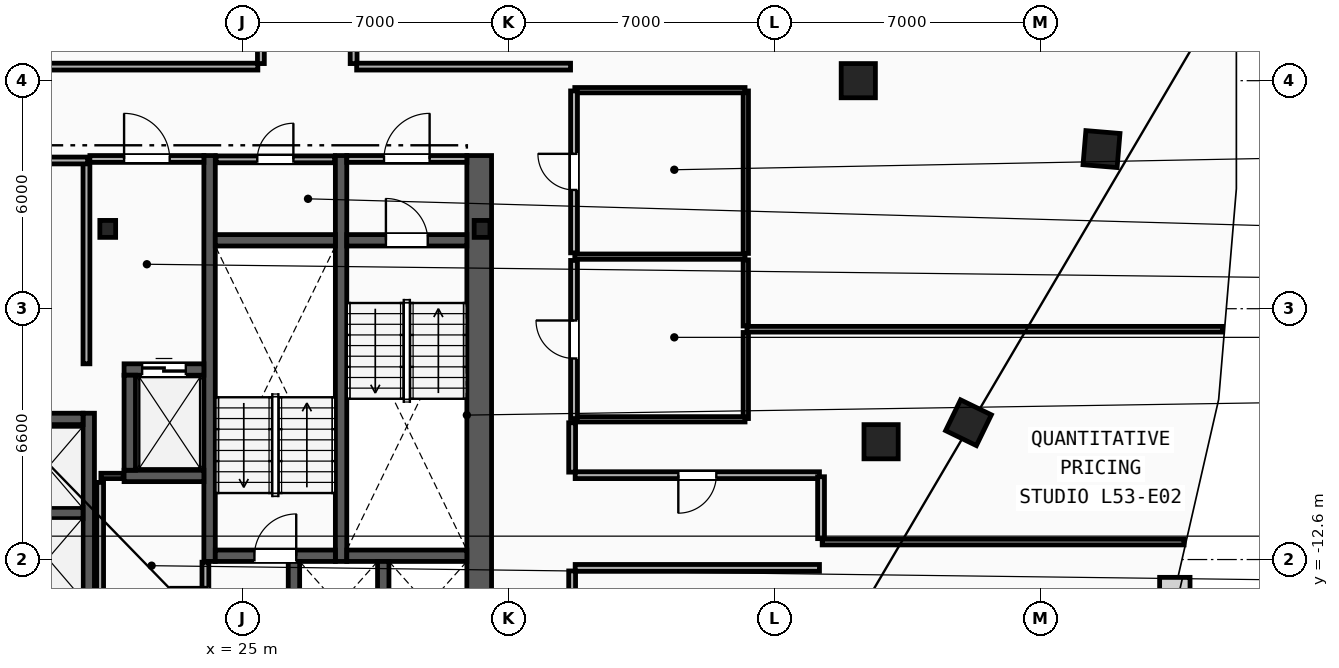
"""IFC4 building model, lengths in metres.
Left out: names, types, materials, properties, quantities, classifications, styles, units other than length and angle.
Written with IfcOpenShell. Run it as: python <this file> out.ifc"""

import sys

from ifc_helpers import new_model, si_unit, direction, frame, frame_2d, origin, origin_2d, place, context, subcontext, project, spatial, rectangle, i_section, extrude, element, fill, save


model = new_model("IFC4")
c1 = context("Model", 3, precision=1e-05, world=origin(), true_north=direction((0.0, 1.0)))
c2 = subcontext(c1, "Body", "Model", "MODEL_VIEW")
j1 = project(units=[si_unit("LENGTHUNIT", "METRE"), si_unit("PLANEANGLEUNIT", "RADIAN")], contexts=[c1])
p1 = place(None, origin())
s1 = spatial("IfcSite", under=j1, at=p1, CompositionType="ELEMENT")
p2 = place(p1, origin())
s2 = spatial("IfcBuilding", under=s1, at=p2, CompositionType="ELEMENT")
p3 = place(p2, frame((0.0, 0.0, 202.6)))
s3 = spatial("IfcBuildingStorey", under=s2, at=p3, CompositionType="ELEMENT", Elevation=202.6)
for number, where, z_axis, x_axis in (
    (1, (31.3, -3.9, 0.0), (0.0, 0.0, 1.0), (1.0, 0.0, 0.0)),
    (2, (21.45, -3.9, 0.0), (0.0, 0.0, 1.0), (1.0, 0.0, 0.0)),
):
    element("IfcColumn", number, at=place(p3, frame(where, z_axis=z_axis, x_axis=x_axis)), inside=s3, PredefinedType="COLUMN", context=c2, shape_type="SweptSolid", body=[
        extrude(i_section(OverallWidth=0.416, OverallDepth=0.446, WebThickness=0.039, FlangeThickness=0.063, FilletRadius=0.018, at=origin_2d()), origin(), (0.0, 0.0, 1.0), 3.6),
    ])
for number, where, z_axis, x_axis in (
    (3, (41.2, 0.0, 0.0), (0.0, 0.0, 1.0), (1.0, 0.0, 0.0)),
    (4, (41.8, -9.5, 0.0), (0.0, 0.0, 1.0), (1.0, 0.0, 0.0)),
    (5, (44.1, -9.0, 0.0), (0.0, 0.0, 1.0), (0.437, 0.899, 0.0)),
    (6, (47.6, -1.8, 0.0), (0.0, 0.0, 1.0), (0.084, 0.997, 0.0)),
):
    element("IfcColumn", number, at=place(p3, frame(where, z_axis=z_axis, x_axis=x_axis)), inside=s3, PredefinedType="COLUMN", context=c2, shape_type="SweptSolid", body=[
        extrude(rectangle(XDim=0.9, YDim=0.9, at=origin_2d()), origin(), (0.0, 0.0, 1.0), 3.6),
    ])
p4 = place(p3, frame((31.225, -15.3, 0.0), z_axis=(0.0, 0.0, 1.0), x_axis=(0.0, 1.0, 0.0)))
e7 = element("IfcWall", 7, at=p4, inside=s3, PredefinedType="SHEAR", context=c2, shape_type="SweptSolid", body=[
    extrude(rectangle(XDim=13.33, YDim=0.65, at=frame_2d((6.665, 0.0))), origin(), (0.0, 0.0, 1.0), 3.34),
])
for number, where, z_axis, x_axis in (
    (8, (27.59, -12.65, 0.0), (0.0, 0.0, 1.0), (0.0, 1.0, 0.0)),
    (9, (24.13, -12.65, 0.0), (0.0, 0.0, 1.0), (0.0, 1.0, 0.0)),
):
    element("IfcWall", number, at=place(p3, frame(where, z_axis=z_axis, x_axis=x_axis)), inside=s3, PredefinedType="SHEAR", context=c2, shape_type="SweptSolid", body=[
        extrude(rectangle(XDim=10.68, YDim=0.3, at=frame_2d((5.34, 0.0))), origin(), (0.0, 0.0, 1.0), 3.34),
    ])
p5 = place(p3, frame((27.74, -4.2, 0.0), z_axis=(0.0, 0.0, 1.0), x_axis=(1.0, 0.0, 0.0)))
e10 = element("IfcWall", 10, at=p5, inside=s3, PredefinedType="SHEAR", context=c2, shape_type="SweptSolid", body=[
    extrude(rectangle(XDim=3.16, YDim=0.3, at=frame_2d((1.58, 0.0))), origin(), (0.0, 0.0, 1.0), 3.34),
])
p6 = place(p5, frame((1.03, 0.0, 0.0)))
e11 = element("IfcOpeningElement", 11, at=p6, cuts=e10, PredefinedType="OPENING", context=c2, shape_type="SweptSolid", body=[
    extrude(rectangle(XDim=1.1, YDim=2.15, at=frame_2d((0.55, 1.075))), frame((0.0, 0.16, 0.0), z_axis=(0.0, -1.0, 0.0), x_axis=(1.0, 0.0, 0.0)), (0.0, 0.0, 1.0), 0.32),
])
p7 = place(p3, frame((27.74, -12.5, 0.0), z_axis=(0.0, 0.0, 1.0), x_axis=(1.0, 0.0, 0.0)))
e12 = element("IfcWall", 12, at=p7, inside=s3, PredefinedType="SHEAR", context=c2, shape_type="SweptSolid", body=[
    extrude(rectangle(XDim=3.16, YDim=0.3, at=frame_2d((1.58, 0.0))), origin(), (0.0, 0.0, 1.0), 3.34),
])
p8 = place(p3, frame((24.28, -12.5, 0.0), z_axis=(0.0, 0.0, 1.0), x_axis=(1.0, 0.0, 0.0)))
e13 = element("IfcWall", 13, at=p8, inside=s3, PredefinedType="SHEAR", context=c2, shape_type="SweptSolid", body=[
    extrude(rectangle(XDim=3.16, YDim=0.3, at=frame_2d((1.58, 0.0))), origin(), (0.0, 0.0, 1.0), 3.34),
])
p9 = place(p8, frame((1.03, 0.0, 0.0)))
e14 = element("IfcOpeningElement", 14, at=p9, cuts=e13, PredefinedType="OPENING", context=c2, shape_type="SweptSolid", body=[
    extrude(rectangle(XDim=1.1, YDim=2.15, at=frame_2d((0.55, 1.075))), frame((0.0, 0.16, 0.0), z_axis=(0.0, -1.0, 0.0), x_axis=(1.0, 0.0, 0.0)), (0.0, 0.0, 1.0), 0.32),
])
p10 = place(p3, frame((24.28, -4.2, 0.0), z_axis=(0.0, 0.0, 1.0), x_axis=(1.0, 0.0, 0.0)))
e15 = element("IfcWall", 15, at=p10, inside=s3, PredefinedType="SHEAR", context=c2, shape_type="SweptSolid", body=[
    extrude(rectangle(XDim=3.16, YDim=0.3, at=frame_2d((1.58, 0.0))), origin(), (0.0, 0.0, 1.0), 3.34),
])
p11 = place(p3, frame((20.89, -7.45, 0.0), z_axis=(0.0, 0.0, 1.0), x_axis=(0.0, 1.0, 0.0)))
e16 = element("IfcWall", 16, at=p11, inside=s3, PredefinedType="PARTITIONING", context=c2, shape_type="SweptSolid", body=[
    extrude(rectangle(XDim=5.3, YDim=0.18, at=frame_2d((2.65, 0.0))), origin(), (0.0, 0.0, 1.0), 3.34),
])
p12 = place(p3, frame((20.98, -2.06, 0.0), z_axis=(0.0, 0.0, 1.0), x_axis=(1.0, 0.0, 0.0)))
e17 = element("IfcWall", 17, at=p12, inside=s3, PredefinedType="PARTITIONING", context=c2, shape_type="SweptSolid", body=[
    extrude(rectangle(XDim=3.0, YDim=0.18, at=frame_2d((1.5, 0.0))), origin(), (0.0, 0.0, 1.0), 3.34),
])
p13 = place(p12, frame((0.9, 0.0, 0.0)))
e18 = element("IfcOpeningElement", 18, at=p13, cuts=e17, PredefinedType="OPENING", context=c2, shape_type="SweptSolid", body=[
    extrude(rectangle(XDim=1.2, YDim=2.15, at=frame_2d((0.6, 1.075))), frame((0.0, 0.1, 0.0), z_axis=(0.0, -1.0, 0.0), x_axis=(1.0, 0.0, 0.0)), (0.0, 0.0, 1.0), 0.2),
])
p14 = place(p3, frame((27.74, -2.06, 0.0), z_axis=(0.0, 0.0, 1.0), x_axis=(1.0, 0.0, 0.0)))
e19 = element("IfcWall", 19, at=p14, inside=s3, PredefinedType="PARTITIONING", context=c2, shape_type="SweptSolid", body=[
    extrude(rectangle(XDim=3.16, YDim=0.18, at=frame_2d((1.58, 0.0))), origin(), (0.0, 0.0, 1.0), 3.34),
])
p15 = place(p14, frame((0.98, 0.0, 0.0)))
e20 = element("IfcOpeningElement", 20, at=p15, cuts=e19, PredefinedType="OPENING", context=c2, shape_type="SweptSolid", body=[
    extrude(rectangle(XDim=1.2, YDim=2.15, at=frame_2d((0.6, 1.075))), frame((0.0, 0.1, 0.0), z_axis=(0.0, -1.0, 0.0), x_axis=(1.0, 0.0, 0.0)), (0.0, 0.0, 1.0), 0.2),
])
p16 = place(p3, frame((21.88, -7.6, 0.0), z_axis=(0.0, 0.0, 1.0), x_axis=(1.0, 0.0, 0.0)))
e21 = element("IfcWall", 21, at=p16, inside=s3, PredefinedType="SHEAR", context=c2, shape_type="SweptSolid", body=[
    extrude(rectangle(XDim=2.1, YDim=0.3, at=frame_2d((1.05, 0.0))), origin(), (0.0, 0.0, 1.0), 3.34),
])
p17 = place(p16, frame((0.475, 0.0, 0.0)))
e22 = element("IfcOpeningElement", 22, at=p17, cuts=e21, PredefinedType="OPENING", context=c2, shape_type="SweptSolid", body=[
    extrude(rectangle(XDim=1.15, YDim=2.2, at=frame_2d((0.575, 1.1))), frame((0.0, 0.16, 0.0), z_axis=(0.0, -1.0, 0.0), x_axis=(1.0, 0.0, 0.0)), (0.0, 0.0, 1.0), 0.32),
])
p18 = place(p3, frame((21.88, -10.4, 0.0), z_axis=(0.0, 0.0, 1.0), x_axis=(1.0, 0.0, 0.0)))
e23 = element("IfcWall", 23, at=p18, inside=s3, PredefinedType="SHEAR", context=c2, shape_type="SweptSolid", body=[
    extrude(rectangle(XDim=2.1, YDim=0.3, at=frame_2d((1.05, 0.0))), origin(), (0.0, 0.0, 1.0), 3.34),
])
p19 = place(p3, frame((22.03, -10.25, 0.0), z_axis=(0.0, 0.0, 1.0), x_axis=(0.0, 1.0, 0.0)))
e24 = element("IfcWall", 24, at=p19, inside=s3, PredefinedType="SHEAR", context=c2, shape_type="SweptSolid", body=[
    extrude(rectangle(XDim=2.5, YDim=0.3, at=frame_2d((1.25, 0.0))), origin(), (0.0, 0.0, 1.0), 3.34),
])
for number, where, z_axis, x_axis in (
    (25, (28.7, -14.95, 0.0), (0.0, 0.0, 1.0), (0.0, 1.0, 0.0)),
    (26, (26.35, -14.95, 0.0), (0.0, 0.0, 1.0), (0.0, 1.0, 0.0)),
):
    element("IfcWall", number, at=place(p3, frame(where, z_axis=z_axis, x_axis=x_axis)), inside=s3, PredefinedType="SHEAR", context=c2, shape_type="SweptSolid", body=[
        extrude(rectangle(XDim=2.3, YDim=0.3, at=frame_2d((1.15, 0.0))), origin(), (0.0, 0.0, 1.0), 3.34),
    ])
p20 = place(p3, frame((20.95, -14.0, 0.0), z_axis=(0.0, 0.0, 1.0), x_axis=(0.0, 1.0, 0.0)))
e27 = element("IfcWall", 27, at=p20, inside=s3, PredefinedType="SHEAR", context=c2, shape_type="SweptSolid", body=[
    extrude(rectangle(XDim=5.25, YDim=0.3, at=frame_2d((2.625, 0.0))), origin(), (0.0, 0.0, 1.0), 3.34),
])
p21 = place(p3, frame((18.65, -8.9, 0.0), z_axis=(0.0, 0.0, 1.0), x_axis=(1.0, 0.0, 0.0)))
e28 = element("IfcWall", 28, at=p21, inside=s3, PredefinedType="SHEAR", context=c2, shape_type="SweptSolid", body=[
    extrude(rectangle(XDim=2.15, YDim=0.3, at=frame_2d((1.075, 0.0))), origin(), (0.0, 0.0, 1.0), 3.34),
])
p22 = place(p3, frame((18.95, -11.375, 0.0), z_axis=(0.0, 0.0, 1.0), x_axis=(1.0, 0.0, 0.0)))
e29 = element("IfcWall", 29, at=p22, inside=s3, PredefinedType="SHEAR", context=c2, shape_type="SweptSolid", body=[
    extrude(rectangle(XDim=1.85, YDim=0.3, at=frame_2d((0.925, 0.0))), origin(), (0.0, 0.0, 1.0), 3.34),
])
p23 = place(p3, frame((21.27, -10.4, 0.0), z_axis=(0.0, 0.0, 1.0), x_axis=(1.0, 0.0, 0.0)))
e30 = element("IfcWall", 30, at=p23, inside=s3, PredefinedType="PARTITIONING", context=c2, shape_type="SweptSolid", body=[
    extrude(rectangle(XDim=0.59, YDim=0.14, at=frame_2d((0.295, 0.0))), origin(), (0.0, 0.0, 1.0), 3.34),
])
p24 = place(p3, frame((21.25, -14.93, 0.0), z_axis=(0.0, 0.0, 1.0), x_axis=(0.0, 1.0, 0.0)))
e31 = element("IfcWall", 31, at=p24, inside=s3, PredefinedType="PARTITIONING", context=c2, shape_type="SweptSolid", body=[
    extrude(rectangle(XDim=4.36, YDim=0.18, at=frame_2d((2.18, 0.0))), origin(), (0.0, 0.0, 1.0), 3.34),
])
p25 = place(p3, frame((24.3, -2.07, 0.0), z_axis=(0.0, 0.0, 1.0), x_axis=(1.0, 0.0, 0.0)))
e32 = element("IfcWall", 32, at=p25, inside=s3, PredefinedType="PARTITIONING", context=c2, shape_type="SweptSolid", body=[
    extrude(rectangle(XDim=3.12, YDim=0.18, at=frame_2d((1.56, 0.0))), origin(), (0.0, 0.0, 1.0), 3.34),
])
p26 = place(p25, frame((1.085, 0.0, 0.0)))
e33 = element("IfcOpeningElement", 33, at=p26, cuts=e32, PredefinedType="OPENING", context=c2, shape_type="SweptSolid", body=[
    extrude(rectangle(XDim=0.95, YDim=2.1, at=frame_2d((0.475, 1.05))), frame((0.0, 0.1, 0.0), z_axis=(0.0, -1.0, 0.0), x_axis=(1.0, 0.0, 0.0)), (0.0, 0.0, 1.0), 0.2),
])
p27 = place(p3, frame((24.02, -14.93, 0.0), z_axis=(0.0, 0.0, 1.0), x_axis=(0.0, 1.0, 0.0)))
e34 = element("IfcWall", 34, at=p27, inside=s3, PredefinedType="PARTITIONING", context=c2, shape_type="SweptSolid", body=[
    extrude(rectangle(XDim=2.26, YDim=0.18, at=frame_2d((1.13, 0.0))), origin(), (0.0, 0.0, 1.0), 3.34),
])
p28 = place(p27, frame((0.655, 0.0, 0.0)))
e35 = element("IfcOpeningElement", 35, at=p28, cuts=e34, PredefinedType="OPENING", context=c2, shape_type="SweptSolid", body=[
    extrude(rectangle(XDim=0.95, YDim=2.1, at=frame_2d((0.475, 1.05))), frame((0.0, 0.1, 0.0), z_axis=(0.0, -1.0, 0.0), x_axis=(1.0, 0.0, 0.0)), (0.0, 0.0, 1.0), 0.2),
])
p29 = place(p3, frame((38.24, -8.89, 0.0), z_axis=(0.0, 0.0, 1.0), x_axis=(0.0, 1.0, 0.0)))
e36 = element("IfcWall", 36, at=p29, inside=s3, PredefinedType="PARTITIONING", context=c2, shape_type="SweptSolid", body=[
    extrude(rectangle(XDim=2.265, YDim=0.14, at=frame_2d((1.132, 0.0))), origin(), (0.0, 0.0, 1.0), 3.34),
])
p30 = place(p3, frame((38.24, -6.455, 0.0), z_axis=(0.0, 0.0, 1.0), x_axis=(0.0, 1.0, 0.0)))
e37 = element("IfcWall", 37, at=p30, inside=s3, PredefinedType="PARTITIONING", context=c2, shape_type="SweptSolid", body=[
    extrude(rectangle(XDim=1.74, YDim=0.14, at=frame_2d((0.87, 0.0))), origin(), (0.0, 0.0, 1.0), 3.34),
])
p31 = place(p3, frame((38.24, -4.545, 0.0), z_axis=(0.0, 0.0, 1.0), x_axis=(0.0, 1.0, 0.0)))
e38 = element("IfcWall", 38, at=p31, inside=s3, PredefinedType="PARTITIONING", context=c2, shape_type="SweptSolid", body=[
    extrude(rectangle(XDim=4.275, YDim=0.14, at=frame_2d((2.137, 0.0))), origin(), (0.0, 0.0, 1.0), 3.34),
])
for number, where, z_axis, x_axis in (
    (39, (33.74, -0.25, 0.0), (0.0, 0.0, 1.0), (1.0, 0.0, 0.0)),
    (40, (33.74, -4.63, 0.0), (0.0, 0.0, 1.0), (1.0, 0.0, 0.0)),
    (41, (33.74, -8.91, 0.0), (0.0, 0.0, 1.0), (1.0, 0.0, 0.0)),
):
    element("IfcWall", number, at=place(p3, frame(where, z_axis=z_axis, x_axis=x_axis)), inside=s3, PredefinedType="PARTITIONING", context=c2, shape_type="SweptSolid", body=[
        extrude(rectangle(XDim=4.48, YDim=0.14, at=frame_2d((2.24, 0.0))), origin(), (0.0, 0.0, 1.0), 3.34),
    ])
p32 = place(p3, frame((33.72, -4.53, 0.0), z_axis=(0.0, 0.0, 1.0), x_axis=(0.0, 1.0, 0.0)))
e42 = element("IfcWall", 42, at=p32, inside=s3, PredefinedType="PARTITIONING", context=c2, shape_type="SweptSolid", body=[
    extrude(rectangle(XDim=4.26, YDim=0.18, at=frame_2d((2.13, 0.0))), origin(), (0.0, 0.0, 1.0), 3.34),
])
p33 = place(p32, frame((1.655, 0.0, 0.0)))
e43 = element("IfcOpeningElement", 43, at=p33, cuts=e42, PredefinedType="OPENING", context=c2, shape_type="SweptSolid", body=[
    extrude(rectangle(XDim=0.95, YDim=2.1, at=frame_2d((0.475, 1.05))), frame((0.0, 0.1, 0.0), z_axis=(0.0, -1.0, 0.0), x_axis=(1.0, 0.0, 0.0)), (0.0, 0.0, 1.0), 0.2),
])
p34 = place(p3, frame((33.72, -8.89, 0.0), z_axis=(0.0, 0.0, 1.0), x_axis=(0.0, 1.0, 0.0)))
e44 = element("IfcWall", 44, at=p34, inside=s3, PredefinedType="PARTITIONING", context=c2, shape_type="SweptSolid", body=[
    extrude(rectangle(XDim=4.16, YDim=0.18, at=frame_2d((2.08, 0.0))), origin(), (0.0, 0.0, 1.0), 3.34),
])
p35 = place(p34, frame((1.58, 0.0, 0.0)))
e45 = element("IfcOpeningElement", 45, at=p35, cuts=e44, PredefinedType="OPENING", context=c2, shape_type="SweptSolid", body=[
    extrude(rectangle(XDim=1.0, YDim=2.15, at=frame_2d((0.5, 1.075))), frame((0.0, 0.1, 0.0), z_axis=(0.0, -1.0, 0.0), x_axis=(1.0, 0.0, 0.0)), (0.0, 0.0, 1.0), 0.2),
])
p36 = place(p3, frame((38.27, -6.54, 0.0), z_axis=(0.0, 0.0, 1.0), x_axis=(1.0, 0.0, 0.0)))
e46 = element("IfcWall", 46, at=p36, inside=s3, PredefinedType="PARTITIONING", context=c2, shape_type="SweptSolid", body=[
    extrude(rectangle(XDim=12.518, YDim=0.15, at=frame_2d((6.259, 0.0))), origin(), (0.0, 0.0, 1.0), 3.34),
])
p37 = place(p3, frame((40.25, -12.14, 0.0), z_axis=(0.0, 0.0, 1.0), x_axis=(1.0, 0.0, 0.0)))
e47 = element("IfcWall", 47, at=p37, inside=s3, PredefinedType="PARTITIONING", context=c2, shape_type="SweptSolid", body=[
    extrude(rectangle(XDim=9.523, YDim=0.15, at=frame_2d((4.761, 0.0))), origin(), (0.0, 0.0, 1.0), 3.34),
])
p38 = place(p3, frame((25.4, 0.37, 0.0), z_axis=(0.0, 0.0, 1.0), x_axis=(-1.0, 0.0, 0.0)))
e48 = element("IfcWall", 48, at=p38, inside=s3, PredefinedType="PARTITIONING", context=c2, shape_type="SweptSolid", body=[
    extrude(rectangle(XDim=8.578, YDim=0.18, at=frame_2d((4.289, 0.0))), origin(), (0.0, 0.0, 1.0), 3.34),
])
p39 = place(p3, frame((25.48, 8.31, 0.0), z_axis=(0.0, 0.0, 1.0), x_axis=(0.0, -1.0, 0.0)))
e49 = element("IfcWall", 49, at=p39, inside=s3, PredefinedType="PARTITIONING", context=c2, shape_type="SweptSolid", body=[
    extrude(rectangle(XDim=7.86, YDim=0.18, at=frame_2d((3.93, 0.0))), origin(), (0.0, 0.0, 1.0), 3.34),
])
p40 = place(p3, frame((33.75, -12.82, 0.0), z_axis=(0.0, 0.0, 1.0), x_axis=(1.0, 0.0, 0.0)))
e50 = element("IfcWall", 50, at=p40, inside=s3, PredefinedType="PARTITIONING", context=c2, shape_type="SweptSolid", body=[
    extrude(rectangle(XDim=6.428, YDim=0.18, at=frame_2d((3.214, 0.0))), origin(), (0.0, 0.0, 1.0), 3.34),
])
p41 = place(p3, frame((33.67, -17.428, 0.0), z_axis=(0.0, 0.0, 1.0), x_axis=(0.0, 1.0, 0.0)))
e51 = element("IfcWall", 51, at=p41, inside=s3, PredefinedType="PARTITIONING", context=c2, shape_type="SweptSolid", body=[
    extrude(rectangle(XDim=4.529, YDim=0.18, at=frame_2d((2.264, 0.0))), origin(), (0.0, 0.0, 1.0), 3.34),
])
p42 = place(p3, frame((16.822, -2.1, 0.0), z_axis=(0.0, 0.0, 1.0), x_axis=(1.0, 0.0, 0.0)))
e52 = element("IfcWall", 52, at=p42, inside=s3, PredefinedType="PARTITIONING", context=c2, shape_type="SweptSolid", body=[
    extrude(rectangle(XDim=4.098, YDim=0.18, at=frame_2d((2.049, 0.0))), origin(), (0.0, 0.0, 1.0), 3.34),
])
p43 = place(p3, frame((40.178, -10.38, 0.0), z_axis=(0.0, 0.0, 1.0), x_axis=(-1.0, 0.0, 0.0)))
e53 = element("IfcWall", 53, at=p43, inside=s3, PredefinedType="PARTITIONING", context=c2, shape_type="SweptSolid", body=[
    extrude(rectangle(XDim=6.428, YDim=0.18, at=frame_2d((3.214, 0.0))), origin(), (0.0, 0.0, 1.0), 3.34),
])
p44 = place(p43, frame((2.714, 0.0, 0.0)))
e54 = element("IfcOpeningElement", 54, at=p44, cuts=e53, PredefinedType="OPENING", context=c2, shape_type="SweptSolid", body=[
    extrude(rectangle(XDim=1.0, YDim=2.15, at=frame_2d((0.5, 1.075))), frame((0.0, 0.1, 0.0), z_axis=(0.0, -1.0, 0.0), x_axis=(1.0, 0.0, 0.0)), (0.0, 0.0, 1.0), 0.2),
])
p45 = place(p3, frame((40.22, -12.05, 0.0), z_axis=(0.0, 0.0, 1.0), x_axis=(0.0, 1.0, 0.0)))
e55 = element("IfcWall", 55, at=p45, inside=s3, PredefinedType="PARTITIONING", context=c2, shape_type="SweptSolid", body=[
    extrude(rectangle(XDim=1.629, YDim=0.18, at=frame_2d((0.814, 0.0))), origin(), (0.0, 0.0, 1.0), 3.34),
])
p46 = place(p3, frame((33.67, -10.3, 0.0), z_axis=(0.0, 0.0, 1.0), x_axis=(0.0, 1.0, 0.0)))
e56 = element("IfcWall", 56, at=p46, inside=s3, PredefinedType="PARTITIONING", context=c2, shape_type="SweptSolid", body=[
    extrude(rectangle(XDim=1.299, YDim=0.18, at=frame_2d((0.649, 0.0))), origin(), (0.0, 0.0, 1.0), 3.34),
])
p47 = place(p3, frame((27.92, 0.45, 0.0), z_axis=(0.0, 0.0, 1.0), x_axis=(0.0, 1.0, 0.0)))
e57 = element("IfcWall", 57, at=p47, inside=s3, PredefinedType="PARTITIONING", context=c2, shape_type="SweptSolid", body=[
    extrude(rectangle(XDim=7.86, YDim=0.18, at=frame_2d((3.93, 0.0))), origin(), (0.0, 0.0, 1.0), 3.34),
])
p48 = place(p47, frame((3.43, 0.0, 0.0)))
e58 = element("IfcOpeningElement", 58, at=p48, cuts=e57, PredefinedType="OPENING", context=c2, shape_type="SweptSolid", body=[
    extrude(rectangle(XDim=1.0, YDim=2.15, at=frame_2d((0.5, 1.075))), frame((0.0, 0.1, 0.0), z_axis=(0.0, -1.0, 0.0), x_axis=(1.0, 0.0, 0.0)), (0.0, 0.0, 1.0), 0.2),
])
p49 = place(p3, frame((33.628, 0.37, 0.0), z_axis=(0.0, 0.0, 1.0), x_axis=(-1.0, 0.0, 0.0)))
e59 = element("IfcWall", 59, at=p49, inside=s3, PredefinedType="PARTITIONING", context=c2, shape_type="SweptSolid", body=[
    extrude(rectangle(XDim=5.628, YDim=0.18, at=frame_2d((2.814, 0.0))), origin(), (0.0, 0.0, 1.0), 3.34),
])
p50 = place(p6, origin())
e60 = element("IfcDoor", 60, at=p50, inside=s3, OperationType="SINGLE_SWING_LEFT", PredefinedType="DOOR", context=c2, shape_type="SweptSolid", body=[
    extrude(rectangle(XDim=1.1, YDim=2.15, at=frame_2d((0.55, 1.075))), frame((0.0, 0.025, 0.0), z_axis=(0.0, -1.0, 0.0), x_axis=(1.0, 0.0, 0.0)), (0.0, 0.0, 1.0), 0.05),
])
fill(e11, e60)
p51 = place(p9, origin())
e61 = element("IfcDoor", 61, at=p51, inside=s3, OperationType="SINGLE_SWING_RIGHT", PredefinedType="DOOR", context=c2, shape_type="SweptSolid", body=[
    extrude(rectangle(XDim=1.1, YDim=2.15, at=frame_2d((0.55, 1.075))), frame((0.0, 0.025, 0.0), z_axis=(0.0, -1.0, 0.0), x_axis=(1.0, 0.0, 0.0)), (0.0, 0.0, 1.0), 0.05),
])
fill(e14, e61)
p52 = place(p13, origin())
e62 = element("IfcDoor", 62, at=p52, inside=s3, OperationType="SINGLE_SWING_LEFT", PredefinedType="DOOR", context=c2, shape_type="SweptSolid", body=[
    extrude(rectangle(XDim=1.2, YDim=2.15, at=frame_2d((0.6, 1.075))), frame((0.0, 0.025, 0.0), z_axis=(0.0, -1.0, 0.0), x_axis=(1.0, 0.0, 0.0)), (0.0, 0.0, 1.0), 0.05),
])
fill(e18, e62)
p53 = place(p15, origin())
e63 = element("IfcDoor", 63, at=p53, inside=s3, OperationType="SINGLE_SWING_RIGHT", PredefinedType="DOOR", context=c2, shape_type="SweptSolid", body=[
    extrude(rectangle(XDim=1.2, YDim=2.15, at=frame_2d((0.6, 1.075))), frame((0.0, 0.025, 0.0), z_axis=(0.0, -1.0, 0.0), x_axis=(1.0, 0.0, 0.0)), (0.0, 0.0, 1.0), 0.05),
])
fill(e20, e63)
p54 = place(p17, origin())
e64 = element("IfcDoor", 64, at=p54, inside=s3, OperationType="SLIDING_TO_LEFT", PredefinedType="TRAPDOOR", context=c2, shape_type="SweptSolid", body=[
    extrude(rectangle(XDim=1.15, YDim=2.2, at=frame_2d((0.575, 1.1))), frame((0.0, 0.025, 0.0), z_axis=(0.0, -1.0, 0.0), x_axis=(1.0, 0.0, 0.0)), (0.0, 0.0, 1.0), 0.05),
])
fill(e22, e64)
p55 = place(p44, origin())
e65 = element("IfcDoor", 65, at=p55, inside=s3, OperationType="SINGLE_SWING_RIGHT", PredefinedType="DOOR", context=c2, shape_type="SweptSolid", body=[
    extrude(rectangle(XDim=1.0, YDim=2.15, at=frame_2d((0.5, 1.075))), frame((0.0, 0.025, 0.0), z_axis=(0.0, -1.0, 0.0), x_axis=(1.0, 0.0, 0.0)), (0.0, 0.0, 1.0), 0.05),
])
fill(e54, e65)
p56 = place(p33, origin())
e66 = element("IfcDoor", 66, at=p56, inside=s3, OperationType="SINGLE_SWING_RIGHT", PredefinedType="DOOR", context=c2, shape_type="SweptSolid", body=[
    extrude(rectangle(XDim=0.95, YDim=2.1, at=frame_2d((0.475, 1.05))), frame((0.0, 0.025, 0.0), z_axis=(0.0, -1.0, 0.0), x_axis=(1.0, 0.0, 0.0)), (0.0, 0.0, 1.0), 0.05),
])
fill(e43, e66)
p57 = place(p35, origin())
e67 = element("IfcDoor", 67, at=p57, inside=s3, OperationType="SINGLE_SWING_RIGHT", PredefinedType="DOOR", context=c2, shape_type="SweptSolid", body=[
    extrude(rectangle(XDim=1.0, YDim=2.15, at=frame_2d((0.5, 1.075))), frame((0.0, 0.025, 0.0), z_axis=(0.0, -1.0, 0.0), x_axis=(1.0, 0.0, 0.0)), (0.0, 0.0, 1.0), 0.05),
])
fill(e45, e67)
p58 = place(p26, origin())
e68 = element("IfcDoor", 68, at=p58, inside=s3, OperationType="SINGLE_SWING_RIGHT", PredefinedType="DOOR", context=c2, shape_type="SweptSolid", body=[
    extrude(rectangle(XDim=0.95, YDim=2.1, at=frame_2d((0.475, 1.05))), frame((0.0, 0.025, 0.0), z_axis=(0.0, -1.0, 0.0), x_axis=(1.0, 0.0, 0.0)), (0.0, 0.0, 1.0), 0.05),
])
fill(e33, e68)
p59 = place(p28, origin())
e69 = element("IfcDoor", 69, at=p59, inside=s3, OperationType="SINGLE_SWING_RIGHT", PredefinedType="DOOR", context=c2, shape_type="SweptSolid", body=[
    extrude(rectangle(XDim=0.95, YDim=2.1, at=frame_2d((0.475, 1.05))), frame((0.0, 0.025, 0.0), z_axis=(0.0, -1.0, 0.0), x_axis=(1.0, 0.0, 0.0)), (0.0, 0.0, 1.0), 0.05),
])
fill(e35, e69)
save(model, sys.argv[1])
